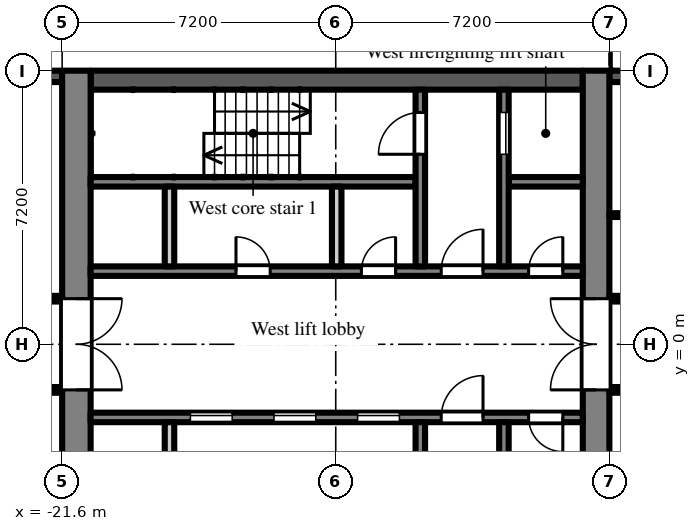
"""IFC4 building model, lengths in metres.
Left out: names, types, materials, properties, quantities, classifications, styles, units other than length and angle.
Written with IfcOpenShell. Run it as: python <this file> out.ifc"""

import sys

from ifc_helpers import new_model, si_unit, direction, frame, frame_2d, origin, place, context, subcontext, project, spatial, rectangle, extrude, element, fill, save


model = new_model("IFC4")
c1 = context("Model", 3, precision=1e-05, world=origin(), true_north=direction((0.0, 1.0)))
c2 = subcontext(c1, "Body", "Model", "MODEL_VIEW")
j1 = project(units=[si_unit("LENGTHUNIT", "METRE"), si_unit("PLANEANGLEUNIT", "RADIAN")], contexts=[c1])
p1 = place(None, origin())
s1 = spatial("IfcSite", under=j1, at=p1, CompositionType="ELEMENT")
p2 = place(p1, origin())
s2 = spatial("IfcBuilding", under=s1, at=p2, CompositionType="ELEMENT")
p3 = place(p2, frame((0.0, 0.0, 108.9)))
s3 = spatial("IfcBuildingStorey", under=s2, at=p3, CompositionType="ELEMENT", Elevation=108.9)
p4 = place(p3, frame((-4.2, 7.05, 0.0), z_axis=(0.0, 0.0, 1.0), x_axis=(-1.0, 0.0, 0.0)))
e1 = element("IfcWall", 1, at=p4, inside=s3, PredefinedType="SOLIDWALL", context=c2, shape_type="SweptSolid", body=[
    extrude(rectangle(XDim=3.0, YDim=0.3, at=frame_2d((1.5, 0.0))), origin(), (0.0, 0.0, 1.0), 2.55),
])
p5 = place(p3, frame((-21.6, 7.05, 0.0), z_axis=(0.0, 0.0, 1.0), x_axis=(-1.0, 0.0, 0.0)))
e2 = element("IfcWall", 2, at=p5, inside=s3, PredefinedType="SOLIDWALL", context=c2, shape_type="SweptSolid", body=[
    extrude(rectangle(XDim=2.7, YDim=0.3, at=frame_2d((1.35, 0.0))), origin(), (0.0, 0.0, 1.0), 2.2),
])
p6 = place(p5, frame((0.75, 0.0, 0.2)))
e3 = element("IfcOpeningElement", 3, at=p6, cuts=e2, PredefinedType="OPENING", context=c2, shape_type="SweptSolid", body=[
    extrude(rectangle(XDim=1.2, YDim=1.85, at=frame_2d((0.6, 0.925))), frame((0.0, 0.16, 0.0), z_axis=(0.0, -1.0, 0.0), x_axis=(1.0, 0.0, 0.0)), (0.0, 0.0, 1.0), 0.32),
])
p7 = place(p3, frame((-7.55, -7.2, 0.0), z_axis=(0.0, 0.0, 1.0), x_axis=(0.0, 1.0, 0.0)))
e4 = element("IfcWall", 4, at=p7, inside=s3, PredefinedType="SHEAR", context=c2, shape_type="SweptSolid", body=[
    extrude(rectangle(XDim=14.4, YDim=0.7, at=frame_2d((7.2, 0.0))), origin(), (0.0, 0.0, 1.0), 2.55),
])
p8 = place(p7, frame((6.0, 0.0, 0.0)))
e5 = element("IfcOpeningElement", 5, at=p8, cuts=e4, PredefinedType="OPENING", context=c2, shape_type="SweptSolid", body=[
    extrude(rectangle(XDim=2.4, YDim=2.2, at=frame_2d((1.2, 1.1))), frame((0.0, 0.36, 0.0), z_axis=(0.0, -1.0, 0.0), x_axis=(1.0, 0.0, 0.0)), (0.0, 0.0, 1.0), 0.72),
])
p9 = place(p3, frame((-21.225, -7.2, 0.0), z_axis=(0.0, 0.0, 1.0), x_axis=(0.0, 1.0, 0.0)))
e6 = element("IfcWall", 6, at=p9, inside=s3, PredefinedType="SHEAR", context=c2, shape_type="SweptSolid", body=[
    extrude(rectangle(XDim=14.4, YDim=0.75, at=frame_2d((7.2, 0.0))), origin(), (0.0, 0.0, 1.0), 2.55),
])
p10 = place(p9, frame((6.0, 0.0, 0.0)))
e7 = element("IfcOpeningElement", 7, at=p10, cuts=e6, PredefinedType="OPENING", context=c2, shape_type="SweptSolid", body=[
    extrude(rectangle(XDim=2.4, YDim=2.2, at=frame_2d((1.2, 1.1))), frame((0.0, 0.385, 0.0), z_axis=(0.0, -1.0, 0.0), x_axis=(1.0, 0.0, 0.0)), (0.0, 0.0, 1.0), 0.77),
])
p11 = place(p3, frame((-7.9, 6.95, 0.0), z_axis=(0.0, 0.0, 1.0), x_axis=(-1.0, 0.0, 0.0)))
e8 = element("IfcWall", 8, at=p11, inside=s3, PredefinedType="SHEAR", context=c2, shape_type="SweptSolid", body=[
    extrude(rectangle(XDim=12.95, YDim=0.5, at=frame_2d((6.475, 0.0))), origin(), (0.0, 0.0, 1.0), 2.55),
])
p12 = place(p3, frame((-7.9, 1.925, 0.0), z_axis=(0.0, 0.0, 1.0), x_axis=(-1.0, 0.0, 0.0)))
e9 = element("IfcWall", 9, at=p12, inside=s3, PredefinedType="SHEAR", context=c2, shape_type="SweptSolid", body=[
    extrude(rectangle(XDim=12.95, YDim=0.25, at=frame_2d((6.475, 0.0))), origin(), (0.0, 0.0, 1.0), 2.55),
])
p13 = place(p12, frame((0.525, 0.0, 0.0)))
e10 = element("IfcOpeningElement", 10, at=p13, cuts=e9, PredefinedType="OPENING", context=c2, shape_type="SweptSolid", body=[
    extrude(rectangle(XDim=0.9, YDim=2.1, at=frame_2d((0.45, 1.05))), frame((0.0, 0.135, 0.0), z_axis=(0.0, -1.0, 0.0), x_axis=(1.0, 0.0, 0.0)), (0.0, 0.0, 1.0), 0.27),
])
p14 = place(p12, frame((2.625, 0.0, 0.0)))
e11 = element("IfcOpeningElement", 11, at=p14, cuts=e9, PredefinedType="OPENING", context=c2, shape_type="SweptSolid", body=[
    extrude(rectangle(XDim=1.1, YDim=2.1, at=frame_2d((0.55, 1.05))), frame((0.0, 0.135, 0.0), z_axis=(0.0, -1.0, 0.0), x_axis=(1.0, 0.0, 0.0)), (0.0, 0.0, 1.0), 0.27),
])
p15 = place(p12, frame((4.925, 0.0, 0.0)))
e12 = element("IfcOpeningElement", 12, at=p15, cuts=e9, PredefinedType="OPENING", context=c2, shape_type="SweptSolid", body=[
    extrude(rectangle(XDim=0.9, YDim=2.1, at=frame_2d((0.45, 1.05))), frame((0.0, 0.135, 0.0), z_axis=(0.0, -1.0, 0.0), x_axis=(1.0, 0.0, 0.0)), (0.0, 0.0, 1.0), 0.27),
])
p16 = place(p12, frame((8.225, 0.0, 0.0)))
e13 = element("IfcOpeningElement", 13, at=p16, cuts=e9, PredefinedType="OPENING", context=c2, shape_type="SweptSolid", body=[
    extrude(rectangle(XDim=0.9, YDim=2.1, at=frame_2d((0.45, 1.05))), frame((0.0, 0.135, 0.0), z_axis=(0.0, -1.0, 0.0), x_axis=(1.0, 0.0, 0.0)), (0.0, 0.0, 1.0), 0.27),
])
p17 = place(p3, frame((-7.9, 4.275, 0.0), z_axis=(0.0, 0.0, 1.0), x_axis=(-1.0, 0.0, 0.0)))
e14 = element("IfcWall", 14, at=p17, inside=s3, PredefinedType="SHEAR", context=c2, shape_type="SweptSolid", body=[
    extrude(rectangle(XDim=1.95, YDim=0.25, at=frame_2d((0.975, 0.0))), origin(), (0.0, 0.0, 1.0), 2.55),
])
p18 = place(p3, frame((-12.3, 4.275, 0.0), z_axis=(0.0, 0.0, 1.0), x_axis=(-1.0, 0.0, 0.0)))
e15 = element("IfcWall", 15, at=p18, inside=s3, PredefinedType="SHEAR", context=c2, shape_type="SweptSolid", body=[
    extrude(rectangle(XDim=8.55, YDim=0.25, at=frame_2d((4.275, 0.0))), origin(), (0.0, 0.0, 1.0), 2.55),
])
p19 = place(p3, frame((-9.975, 2.05, 0.0), z_axis=(0.0, 0.0, 1.0), x_axis=(0.0, 1.0, 0.0)))
e16 = element("IfcWall", 16, at=p19, inside=s3, PredefinedType="SHEAR", context=c2, shape_type="SweptSolid", body=[
    extrude(rectangle(XDim=4.65, YDim=0.25, at=frame_2d((2.325, 0.0))), origin(), (0.0, 0.0, 1.0), 2.55),
])
p20 = place(p19, frame((2.95, 0.0, 0.0)))
e17 = element("IfcOpeningElement", 17, at=p20, cuts=e16, PredefinedType="OPENING", context=c2, shape_type="SweptSolid", body=[
    extrude(rectangle(XDim=1.1, YDim=2.1, at=frame_2d((0.55, 1.05))), frame((0.0, 0.135, 0.0), z_axis=(0.0, -1.0, 0.0), x_axis=(1.0, 0.0, 0.0)), (0.0, 0.0, 1.0), 0.27),
])
p21 = place(p3, frame((-12.175, 2.05, 0.0), z_axis=(0.0, 0.0, 1.0), x_axis=(0.0, 1.0, 0.0)))
e18 = element("IfcWall", 18, at=p21, inside=s3, PredefinedType="SHEAR", context=c2, shape_type="SweptSolid", body=[
    extrude(rectangle(XDim=4.65, YDim=0.25, at=frame_2d((2.325, 0.0))), origin(), (0.0, 0.0, 1.0), 2.55),
])
p22 = place(p21, frame((2.95, 0.0, 0.0)))
e19 = element("IfcOpeningElement", 19, at=p22, cuts=e18, PredefinedType="OPENING", context=c2, shape_type="SweptSolid", body=[
    extrude(rectangle(XDim=1.1, YDim=2.1, at=frame_2d((0.55, 1.05))), frame((0.0, 0.135, 0.0), z_axis=(0.0, -1.0, 0.0), x_axis=(1.0, 0.0, 0.0)), (0.0, 0.0, 1.0), 0.27),
])
for number, where, z_axis, x_axis in (
    (20, (-14.375, 2.05, 0.0), (0.0, 0.0, 1.0), (0.0, 1.0, 0.0)),
    (21, (-18.775, 2.05, 0.0), (0.0, 0.0, 1.0), (0.0, 1.0, 0.0)),
):
    element("IfcWall", number, at=place(p3, frame(where, z_axis=z_axis, x_axis=x_axis)), inside=s3, PredefinedType="PARTITIONING", context=c2, shape_type="SweptSolid", body=[
        extrude(rectangle(XDim=2.1, YDim=0.25, at=frame_2d((1.05, 0.0))), origin(), (0.0, 0.0, 1.0), 2.55),
    ])
p23 = place(p3, frame((-7.9, -1.925, 0.0), z_axis=(0.0, 0.0, 1.0), x_axis=(-1.0, 0.0, 0.0)))
e22 = element("IfcWall", 22, at=p23, inside=s3, PredefinedType="SHEAR", context=c2, shape_type="SweptSolid", body=[
    extrude(rectangle(XDim=12.95, YDim=0.25, at=frame_2d((6.475, 0.0))), origin(), (0.0, 0.0, 1.0), 2.55),
])
p24 = place(p23, frame((4.825, 0.0, 0.0)))
e23 = element("IfcOpeningElement", 23, at=p24, cuts=e22, PredefinedType="OPENING", context=c2, shape_type="SweptSolid", body=[
    extrude(rectangle(XDim=1.1, YDim=2.1, at=frame_2d((0.55, 1.05))), frame((0.0, 0.135, 0.0), z_axis=(0.0, -1.0, 0.0), x_axis=(1.0, 0.0, 0.0)), (0.0, 0.0, 1.0), 0.27),
])
p25 = place(p23, frame((7.025, 0.0, 0.0)))
e24 = element("IfcOpeningElement", 24, at=p25, cuts=e22, PredefinedType="OPENING", context=c2, shape_type="SweptSolid", body=[
    extrude(rectangle(XDim=1.1, YDim=2.1, at=frame_2d((0.55, 1.05))), frame((0.0, 0.135, 0.0), z_axis=(0.0, -1.0, 0.0), x_axis=(1.0, 0.0, 0.0)), (0.0, 0.0, 1.0), 0.27),
])
p26 = place(p23, frame((9.225, 0.0, 0.0)))
e25 = element("IfcOpeningElement", 25, at=p26, cuts=e22, PredefinedType="OPENING", context=c2, shape_type="SweptSolid", body=[
    extrude(rectangle(XDim=1.1, YDim=2.1, at=frame_2d((0.55, 1.05))), frame((0.0, 0.135, 0.0), z_axis=(0.0, -1.0, 0.0), x_axis=(1.0, 0.0, 0.0)), (0.0, 0.0, 1.0), 0.27),
])
p27 = place(p23, frame((0.525, 0.0, 0.0)))
e26 = element("IfcOpeningElement", 26, at=p27, cuts=e22, PredefinedType="OPENING", context=c2, shape_type="SweptSolid", body=[
    extrude(rectangle(XDim=0.9, YDim=2.1, at=frame_2d((0.45, 1.05))), frame((0.0, 0.135, 0.0), z_axis=(0.0, -1.0, 0.0), x_axis=(1.0, 0.0, 0.0)), (0.0, 0.0, 1.0), 0.27),
])
p28 = place(p23, frame((2.625, 0.0, 0.0)))
e27 = element("IfcOpeningElement", 27, at=p28, cuts=e22, PredefinedType="OPENING", context=c2, shape_type="SweptSolid", body=[
    extrude(rectangle(XDim=1.1, YDim=2.1, at=frame_2d((0.55, 1.05))), frame((0.0, 0.135, 0.0), z_axis=(0.0, -1.0, 0.0), x_axis=(1.0, 0.0, 0.0)), (0.0, 0.0, 1.0), 0.27),
])
p29 = place(p3, frame((-9.975, -2.05, 0.0), z_axis=(0.0, 0.0, 1.0), x_axis=(0.0, -1.0, 0.0)))
e28 = element("IfcWall", 28, at=p29, inside=s3, PredefinedType="SHEAR", context=c2, shape_type="SweptSolid", body=[
    extrude(rectangle(XDim=4.65, YDim=0.25, at=frame_2d((2.325, 0.0))), origin(), (0.0, 0.0, 1.0), 2.55),
])
p30 = place(p29, frame((2.95, 0.0, 0.0)))
e29 = element("IfcOpeningElement", 29, at=p30, cuts=e28, PredefinedType="OPENING", context=c2, shape_type="SweptSolid", body=[
    extrude(rectangle(XDim=1.1, YDim=2.1, at=frame_2d((0.55, 1.05))), frame((0.0, 0.135, 0.0), z_axis=(0.0, -1.0, 0.0), x_axis=(1.0, 0.0, 0.0)), (0.0, 0.0, 1.0), 0.27),
])
p31 = place(p3, frame((-12.175, -2.05, 0.0), z_axis=(0.0, 0.0, 1.0), x_axis=(0.0, -1.0, 0.0)))
e30 = element("IfcWall", 30, at=p31, inside=s3, PredefinedType="SHEAR", context=c2, shape_type="SweptSolid", body=[
    extrude(rectangle(XDim=4.65, YDim=0.25, at=frame_2d((2.325, 0.0))), origin(), (0.0, 0.0, 1.0), 2.55),
])
p32 = place(p31, frame((2.95, 0.0, 0.0)))
e31 = element("IfcOpeningElement", 31, at=p32, cuts=e30, PredefinedType="OPENING", context=c2, shape_type="SweptSolid", body=[
    extrude(rectangle(XDim=1.1, YDim=2.1, at=frame_2d((0.55, 1.05))), frame((0.0, 0.135, 0.0), z_axis=(0.0, -1.0, 0.0), x_axis=(1.0, 0.0, 0.0)), (0.0, 0.0, 1.0), 0.27),
])
p33 = place(p3, frame((-18.775, -2.05, 0.0), z_axis=(0.0, 0.0, 1.0), x_axis=(0.0, -1.0, 0.0)))
e32 = element("IfcWall", 32, at=p33, inside=s3, PredefinedType="PARTITIONING", context=c2, shape_type="SweptSolid", body=[
    extrude(rectangle(XDim=2.1, YDim=0.25, at=frame_2d((1.05, 0.0))), origin(), (0.0, 0.0, 1.0), 2.55),
])
p34 = place(p3, frame((-36.5, -1.2, 0.0), z_axis=(0.0, 0.0, 1.0), x_axis=(1.0, 0.0, 0.0)))
e33 = element("IfcWall", 33, at=p34, inside=s3, PredefinedType="PARTITIONING", context=c2, shape_type="SweptSolid", body=[
    extrude(rectangle(XDim=14.9, YDim=0.15, at=frame_2d((7.45, 0.0))), origin(), (0.0, 0.0, 1.0), 2.55),
])
p35 = place(p34, frame((10.4, 0.0, 0.0)))
e34 = element("IfcOpeningElement", 34, at=p35, cuts=e33, PredefinedType="OPENING", context=c2, shape_type="SweptSolid", body=[
    extrude(rectangle(XDim=1.8, YDim=2.1, at=frame_2d((0.9, 1.05))), frame((0.0, 0.085, 0.0), z_axis=(0.0, -1.0, 0.0), x_axis=(1.0, 0.0, 0.0)), (0.0, 0.0, 1.0), 0.17),
])
p36 = place(p34, frame((6.35, 0.0, 0.0)))
e35 = element("IfcOpeningElement", 35, at=p36, cuts=e33, PredefinedType="OPENING", context=c2, shape_type="SweptSolid", body=[
    extrude(rectangle(XDim=0.9, YDim=2.1, at=frame_2d((0.45, 1.05))), frame((0.0, 0.085, 0.0), z_axis=(0.0, -1.0, 0.0), x_axis=(1.0, 0.0, 0.0)), (0.0, 0.0, 1.0), 0.17),
])
p37 = place(p34, frame((4.55, 0.0, 0.0)))
e36 = element("IfcOpeningElement", 36, at=p37, cuts=e33, PredefinedType="OPENING", context=c2, shape_type="SweptSolid", body=[
    extrude(rectangle(XDim=0.9, YDim=2.1, at=frame_2d((0.45, 1.05))), frame((0.0, 0.085, 0.0), z_axis=(0.0, -1.0, 0.0), x_axis=(1.0, 0.0, 0.0)), (0.0, 0.0, 1.0), 0.17),
])
p38 = place(p34, frame((1.15, 0.0, 0.0)))
e37 = element("IfcOpeningElement", 37, at=p38, cuts=e33, PredefinedType="OPENING", context=c2, shape_type="SweptSolid", body=[
    extrude(rectangle(XDim=1.8, YDim=2.1, at=frame_2d((0.9, 1.05))), frame((0.0, 0.085, 0.0), z_axis=(0.0, -1.0, 0.0), x_axis=(1.0, 0.0, 0.0)), (0.0, 0.0, 1.0), 0.17),
])
p39 = place(p3, frame((-36.5, 1.2, 0.0), z_axis=(0.0, 0.0, 1.0), x_axis=(1.0, 0.0, 0.0)))
e38 = element("IfcWall", 38, at=p39, inside=s3, PredefinedType="PARTITIONING", context=c2, shape_type="SweptSolid", body=[
    extrude(rectangle(XDim=14.9, YDim=0.15, at=frame_2d((7.45, 0.0))), origin(), (0.0, 0.0, 1.0), 2.55),
])
p40 = place(p39, frame((10.1, 0.0, 0.0)))
e39 = element("IfcOpeningElement", 39, at=p40, cuts=e38, PredefinedType="OPENING", context=c2, shape_type="SweptSolid", body=[
    extrude(rectangle(XDim=1.0, YDim=2.1, at=frame_2d((0.5, 1.05))), frame((0.0, 0.085, 0.0), z_axis=(0.0, -1.0, 0.0), x_axis=(1.0, 0.0, 0.0)), (0.0, 0.0, 1.0), 0.17),
])
p41 = place(p39, frame((6.35, 0.0, 0.0)))
e40 = element("IfcOpeningElement", 40, at=p41, cuts=e38, PredefinedType="OPENING", context=c2, shape_type="SweptSolid", body=[
    extrude(rectangle(XDim=0.9, YDim=2.1, at=frame_2d((0.45, 1.05))), frame((0.0, 0.085, 0.0), z_axis=(0.0, -1.0, 0.0), x_axis=(1.0, 0.0, 0.0)), (0.0, 0.0, 1.0), 0.17),
])
p42 = place(p39, frame((4.55, 0.0, 0.0)))
e41 = element("IfcOpeningElement", 41, at=p42, cuts=e38, PredefinedType="OPENING", context=c2, shape_type="SweptSolid", body=[
    extrude(rectangle(XDim=0.9, YDim=2.1, at=frame_2d((0.45, 1.05))), frame((0.0, 0.085, 0.0), z_axis=(0.0, -1.0, 0.0), x_axis=(1.0, 0.0, 0.0)), (0.0, 0.0, 1.0), 0.17),
])
p43 = place(p39, frame((1.15, 0.0, 0.0)))
e42 = element("IfcOpeningElement", 42, at=p43, cuts=e38, PredefinedType="OPENING", context=c2, shape_type="SweptSolid", body=[
    extrude(rectangle(XDim=1.8, YDim=2.1, at=frame_2d((0.9, 1.05))), frame((0.0, 0.085, 0.0), z_axis=(0.0, -1.0, 0.0), x_axis=(1.0, 0.0, 0.0)), (0.0, 0.0, 1.0), 0.17),
])
p44 = place(p3, frame((-7.2, -1.2, 0.0), z_axis=(0.0, 0.0, 1.0), x_axis=(1.0, 0.0, 0.0)))
e43 = element("IfcWall", 43, at=p44, inside=s3, PredefinedType="PARTITIONING", context=c2, shape_type="SweptSolid", body=[
    extrude(rectangle(XDim=6.075, YDim=0.15, at=frame_2d((3.038, 0.0))), origin(), (0.0, 0.0, 1.0), 2.55),
])
p45 = place(p44, frame((2.55, 0.0, 0.0)))
e44 = element("IfcOpeningElement", 44, at=p45, cuts=e43, PredefinedType="OPENING", context=c2, shape_type="SweptSolid", body=[
    extrude(rectangle(XDim=0.9, YDim=2.1, at=frame_2d((0.45, 1.05))), frame((0.0, 0.085, 0.0), z_axis=(0.0, -1.0, 0.0), x_axis=(1.0, 0.0, 0.0)), (0.0, 0.0, 1.0), 0.17),
])
p46 = place(p44, frame((0.55, 0.0, 0.0)))
e45 = element("IfcOpeningElement", 45, at=p46, cuts=e43, PredefinedType="OPENING", context=c2, shape_type="SweptSolid", body=[
    extrude(rectangle(XDim=0.9, YDim=2.1, at=frame_2d((0.45, 1.05))), frame((0.0, 0.085, 0.0), z_axis=(0.0, -1.0, 0.0), x_axis=(1.0, 0.0, 0.0)), (0.0, 0.0, 1.0), 0.17),
])
p47 = place(p3, frame((-7.2, 1.2, 0.0), z_axis=(0.0, 0.0, 1.0), x_axis=(1.0, 0.0, 0.0)))
e46 = element("IfcWall", 46, at=p47, inside=s3, PredefinedType="PARTITIONING", context=c2, shape_type="SweptSolid", body=[
    extrude(rectangle(XDim=6.075, YDim=0.15, at=frame_2d((3.038, 0.0))), origin(), (0.0, 0.0, 1.0), 2.55),
])
p48 = place(p47, frame((2.55, 0.0, 0.0)))
e47 = element("IfcOpeningElement", 47, at=p48, cuts=e46, PredefinedType="OPENING", context=c2, shape_type="SweptSolid", body=[
    extrude(rectangle(XDim=0.9, YDim=2.1, at=frame_2d((0.45, 1.05))), frame((0.0, 0.085, 0.0), z_axis=(0.0, -1.0, 0.0), x_axis=(1.0, 0.0, 0.0)), (0.0, 0.0, 1.0), 0.17),
])
p49 = place(p3, frame((-7.2, 3.4, 0.0), z_axis=(0.0, 0.0, 1.0), x_axis=(1.0, 0.0, 0.0)))
e48 = element("IfcWall", 48, at=p49, inside=s3, PredefinedType="PARTITIONING", context=c2, shape_type="SweptSolid", body=[
    extrude(rectangle(XDim=5.925, YDim=0.1, at=frame_2d((2.962, 0.0))), origin(), (0.0, 0.0, 1.0), 2.55),
])
p50 = place(p24, origin())
e49 = element("IfcDoor", 49, at=p50, inside=s3, OperationType="SLIDING_TO_LEFT", PredefinedType="DOOR", context=c2, shape_type="SweptSolid", body=[
    extrude(rectangle(XDim=1.1, YDim=2.1, at=frame_2d((0.55, 1.05))), frame((0.0, 0.025, 0.0), z_axis=(0.0, -1.0, 0.0), x_axis=(1.0, 0.0, 0.0)), (0.0, 0.0, 1.0), 0.05),
])
fill(e23, e49)
p51 = place(p25, origin())
e50 = element("IfcDoor", 50, at=p51, inside=s3, OperationType="SLIDING_TO_LEFT", PredefinedType="DOOR", context=c2, shape_type="SweptSolid", body=[
    extrude(rectangle(XDim=1.1, YDim=2.1, at=frame_2d((0.55, 1.05))), frame((0.0, 0.025, 0.0), z_axis=(0.0, -1.0, 0.0), x_axis=(1.0, 0.0, 0.0)), (0.0, 0.0, 1.0), 0.05),
])
fill(e24, e50)
p52 = place(p26, origin())
e51 = element("IfcDoor", 51, at=p52, inside=s3, OperationType="SLIDING_TO_LEFT", PredefinedType="DOOR", context=c2, shape_type="SweptSolid", body=[
    extrude(rectangle(XDim=1.1, YDim=2.1, at=frame_2d((0.55, 1.05))), frame((0.0, 0.025, 0.0), z_axis=(0.0, -1.0, 0.0), x_axis=(1.0, 0.0, 0.0)), (0.0, 0.0, 1.0), 0.05),
])
fill(e25, e51)
p53 = place(p20, origin())
e52 = element("IfcDoor", 52, at=p53, inside=s3, OperationType="SLIDING_TO_LEFT", PredefinedType="DOOR", context=c2, shape_type="SweptSolid", body=[
    extrude(rectangle(XDim=1.1, YDim=2.1, at=frame_2d((0.55, 1.05))), frame((0.0, 0.025, 0.0), z_axis=(0.0, -1.0, 0.0), x_axis=(1.0, 0.0, 0.0)), (0.0, 0.0, 1.0), 0.05),
])
fill(e17, e52)
p54 = place(p22, origin())
e53 = element("IfcDoor", 53, at=p54, inside=s3, OperationType="SINGLE_SWING_LEFT", PredefinedType="DOOR", context=c2, shape_type="SweptSolid", body=[
    extrude(rectangle(XDim=1.1, YDim=2.1, at=frame_2d((0.55, 1.05))), frame((0.0, 0.025, 0.0), z_axis=(0.0, -1.0, 0.0), x_axis=(1.0, 0.0, 0.0)), (0.0, 0.0, 1.0), 0.05),
])
fill(e19, e53)
p55 = place(p13, frame((0.9, 0.0, 0.0), z_axis=(0.0, 0.0, 1.0), x_axis=(-1.0, 0.0, 0.0)))
e54 = element("IfcDoor", 54, at=p55, inside=s3, OperationType="SINGLE_SWING_RIGHT", PredefinedType="DOOR", context=c2, shape_type="SweptSolid", body=[
    extrude(rectangle(XDim=0.9, YDim=2.1, at=frame_2d((0.45, 1.05))), frame((0.0, 0.025, 0.0), z_axis=(0.0, -1.0, 0.0), x_axis=(1.0, 0.0, 0.0)), (0.0, 0.0, 1.0), 0.05),
])
fill(e10, e54)
p56 = place(p27, origin())
e55 = element("IfcDoor", 55, at=p56, inside=s3, OperationType="SINGLE_SWING_LEFT", PredefinedType="DOOR", context=c2, shape_type="SweptSolid", body=[
    extrude(rectangle(XDim=0.9, YDim=2.1, at=frame_2d((0.45, 1.05))), frame((0.0, 0.025, 0.0), z_axis=(0.0, -1.0, 0.0), x_axis=(1.0, 0.0, 0.0)), (0.0, 0.0, 1.0), 0.05),
])
fill(e26, e55)
p57 = place(p14, frame((1.1, 0.0, 0.0), z_axis=(0.0, 0.0, 1.0), x_axis=(-1.0, 0.0, 0.0)))
e56 = element("IfcDoor", 56, at=p57, inside=s3, OperationType="SINGLE_SWING_RIGHT", PredefinedType="DOOR", context=c2, shape_type="SweptSolid", body=[
    extrude(rectangle(XDim=1.1, YDim=2.1, at=frame_2d((0.55, 1.05))), frame((0.0, 0.025, 0.0), z_axis=(0.0, -1.0, 0.0), x_axis=(1.0, 0.0, 0.0)), (0.0, 0.0, 1.0), 0.05),
])
fill(e11, e56)
p58 = place(p28, frame((1.1, 0.0, 0.0), z_axis=(0.0, 0.0, 1.0), x_axis=(-1.0, 0.0, 0.0)))
e57 = element("IfcDoor", 57, at=p58, inside=s3, OperationType="SINGLE_SWING_RIGHT", PredefinedType="DOOR", context=c2, shape_type="SweptSolid", body=[
    extrude(rectangle(XDim=1.1, YDim=2.1, at=frame_2d((0.55, 1.05))), frame((0.0, 0.025, 0.0), z_axis=(0.0, -1.0, 0.0), x_axis=(1.0, 0.0, 0.0)), (0.0, 0.0, 1.0), 0.05),
])
fill(e27, e57)
p59 = place(p8, origin())
e58 = element("IfcDoor", 58, at=p59, inside=s3, OperationType="DOUBLE_DOOR_DOUBLE_SWING", PredefinedType="DOOR", context=c2, shape_type="SweptSolid", body=[
    extrude(rectangle(XDim=2.4, YDim=2.2, at=frame_2d((1.2, 1.1))), frame((0.0, 0.025, 0.0), z_axis=(0.0, -1.0, 0.0), x_axis=(1.0, 0.0, 0.0)), (0.0, 0.0, 1.0), 0.05),
])
fill(e5, e58)
p60 = place(p10, frame((2.4, 0.0, 0.0), z_axis=(0.0, 0.0, 1.0), x_axis=(-1.0, 0.0, 0.0)))
e59 = element("IfcDoor", 59, at=p60, inside=s3, OperationType="DOUBLE_DOOR_DOUBLE_SWING", PredefinedType="DOOR", context=c2, shape_type="SweptSolid", body=[
    extrude(rectangle(XDim=2.4, YDim=2.2, at=frame_2d((1.2, 1.1))), frame((0.0, 0.025, 0.0), z_axis=(0.0, -1.0, 0.0), x_axis=(1.0, 0.0, 0.0)), (0.0, 0.0, 1.0), 0.05),
])
fill(e7, e59)
p61 = place(p15, frame((0.9, 0.0, 0.0), z_axis=(0.0, 0.0, 1.0), x_axis=(-1.0, 0.0, 0.0)))
e60 = element("IfcDoor", 60, at=p61, inside=s3, OperationType="SINGLE_SWING_RIGHT", PredefinedType="DOOR", context=c2, shape_type="SweptSolid", body=[
    extrude(rectangle(XDim=0.9, YDim=2.1, at=frame_2d((0.45, 1.05))), frame((0.0, 0.025, 0.0), z_axis=(0.0, -1.0, 0.0), x_axis=(1.0, 0.0, 0.0)), (0.0, 0.0, 1.0), 0.05),
])
fill(e12, e60)
p62 = place(p16, frame((0.9, 0.0, 0.0), z_axis=(0.0, 0.0, 1.0), x_axis=(-1.0, 0.0, 0.0)))
e61 = element("IfcDoor", 61, at=p62, inside=s3, OperationType="SINGLE_SWING_LEFT", PredefinedType="DOOR", context=c2, shape_type="SweptSolid", body=[
    extrude(rectangle(XDim=0.9, YDim=2.1, at=frame_2d((0.45, 1.05))), frame((0.0, 0.025, 0.0), z_axis=(0.0, -1.0, 0.0), x_axis=(1.0, 0.0, 0.0)), (0.0, 0.0, 1.0), 0.05),
])
fill(e13, e61)
save(model, sys.argv[1])
